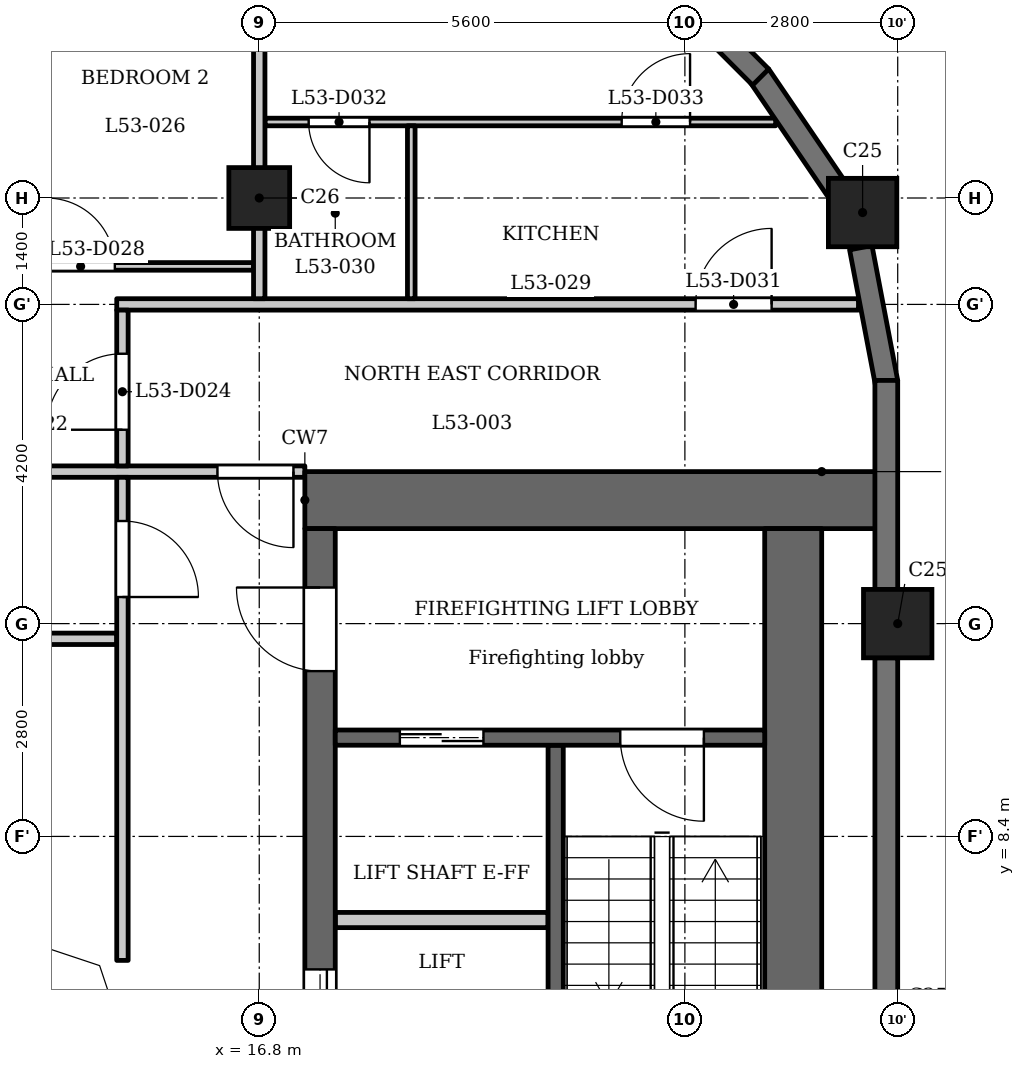
"""IFC4 building model, lengths in metres.
Left out: names, types, materials, properties, quantities, classifications, styles, units other than length and angle.
Written with IfcOpenShell. Run it as: python <this file> out.ifc"""

import sys

from ifc_helpers import new_model, si_unit, direction, frame, frame_2d, origin, origin_2d, place, context, subcontext, project, spatial, polyline, rectangle, outline, extrude, element, fill, save


model = new_model("IFC4")
c1 = context("Model", 3, precision=1e-05, world=origin(), true_north=direction((0.0, 1.0)))
c2 = subcontext(c1, "Body", "Model", "MODEL_VIEW")
j1 = project(units=[si_unit("LENGTHUNIT", "METRE"), si_unit("PLANEANGLEUNIT", "RADIAN")], contexts=[c1])
p1 = place(None, origin())
s1 = spatial("IfcSite", under=j1, at=p1, CompositionType="ELEMENT")
p2 = place(p1, origin())
s2 = spatial("IfcBuilding", under=s1, at=p2, CompositionType="ELEMENT")
p3 = place(p2, frame((0.0, 0.0, 206.4)))
s3 = spatial("IfcBuildingStorey", under=s2, at=p3, CompositionType="ELEMENT", Elevation=206.4)
for number, where, z_axis, x_axis in (
    (1, (25.2, 11.2, 0.0), (0.0, 0.0, 1.0), (1.0, 0.0, 0.0)),
    (2, (24.738, 16.609, 0.0), (0.0, 0.0, 1.0), (1.0, 0.0, 0.0)),
):
    element("IfcColumn", number, at=place(p3, frame(where, z_axis=z_axis, x_axis=x_axis)), inside=s3, PredefinedType="COLUMN", context=c2, shape_type="SweptSolid", body=[
        extrude(rectangle(XDim=0.9, YDim=0.9, at=origin_2d()), origin(), (0.0, 0.0, 1.0), 3.5),
    ])
p4 = place(p3, frame((16.8, 16.8, 0.0), z_axis=(0.0, 0.0, 1.0), x_axis=(1.0, 0.0, 0.0)))
e3 = element("IfcColumn", 3, at=p4, inside=s3, PredefinedType="COLUMN", context=c2, shape_type="SweptSolid", body=[
    extrude(rectangle(XDim=0.8, YDim=0.8, at=origin_2d()), origin(), (0.0, 0.0, 1.0), 3.5),
])
p5 = place(p3, frame((25.05, 6.05, 0.0), z_axis=(0.0, 0.0, 1.0), x_axis=(0.0, 1.0, 0.0)))
e4 = element("IfcWall", 4, at=p5, inside=s3, PredefinedType="SOLIDWALL", context=c2, shape_type="SweptSolid", body=[
    extrude(rectangle(XDim=4.7, YDim=0.3, at=frame_2d((2.35, 0.0))), origin(), (0.0, 0.0, 1.0), 2.5),
])
p6 = place(p3, frame((25.05, 11.65, 0.0), z_axis=(0.0, 0.0, 1.0), x_axis=(0.0, 1.0, 0.0)))
e5 = element("IfcWall", 5, at=p6, inside=s3, PredefinedType="SOLIDWALL", context=c2, shape_type="SweptSolid", body=[
    extrude(rectangle(XDim=2.75, YDim=0.3, at=frame_2d((1.375, 0.0))), origin(), (0.0, 0.0, 1.0), 2.5),
])
for number, where, z_axis, x_axis in (
    (6, (25.053, 14.372, 0.0), (0.0, 0.0, 1.0), (-0.187, 0.982, 0.0)),
    (7, (24.394, 16.919, 0.0), (0.0, 0.0, 1.0), (-0.562, 0.827, 0.0)),
):
    element("IfcWall", number, at=place(p3, frame(where, z_axis=z_axis, x_axis=x_axis)), inside=s3, PredefinedType="SOLIDWALL", context=c2, shape_type="SweptSolid", body=[
        extrude(rectangle(XDim=1.806, YDim=0.3, at=frame_2d((0.903, 0.0))), origin(), (0.0, 0.0, 1.0), 2.5),
    ])
p7 = place(p3, frame((23.397, 18.391, 0.0), z_axis=(0.0, 0.0, 1.0), x_axis=(-0.707106781187, 0.707106781187, 0.0)))
e8 = element("IfcWall", 8, at=p7, inside=s3, PredefinedType="SOLIDWALL", context=c2, shape_type="SweptSolid", body=[
    extrude(rectangle(XDim=2.75, YDim=0.3, at=frame_2d((1.375, 0.0))), origin(), (0.0, 0.0, 1.0), 2.5),
])
p8 = place(p7, frame((0.775, 0.0, 0.6)))
e9 = element("IfcOpeningElement", 9, at=p8, cuts=e8, PredefinedType="OPENING", context=c2, shape_type="SweptSolid", body=[
    extrude(rectangle(XDim=1.2, YDim=1.55, at=frame_2d((0.6, 0.775))), frame((0.0, 0.16, 0.0), z_axis=(0.0, -1.0, 0.0), x_axis=(1.0, 0.0, 0.0)), (0.0, 0.0, 1.0), 0.32),
])
p9 = place(p3, frame((20.7, 2.6, 0.0), z_axis=(0.0, 0.0, 1.0), x_axis=(0.0, 1.0, 0.0)))
e10 = element("IfcWall", 10, at=p9, inside=s3, PredefinedType="SHEAR", context=c2, shape_type="SweptSolid", body=[
    extrude(rectangle(XDim=7.0, YDim=0.2, at=frame_2d((3.5, 0.0))), origin(), (0.0, 0.0, 1.0), 3.2),
])
p10 = place(p3, frame((17.4, 12.825, 0.0), z_axis=(0.0, 0.0, 1.0), x_axis=(1.0, 0.0, 0.0)))
e11 = element("IfcWall", 11, at=p10, inside=s3, PredefinedType="SHEAR", context=c2, shape_type="SweptSolid", body=[
    extrude(rectangle(XDim=7.6, YDim=0.75, at=frame_2d((3.8, 0.0))), origin(), (0.0, 0.0, 1.0), 3.2),
])
p11 = place(p3, frame((17.6, -12.45, 0.0), z_axis=(0.0, 0.0, 1.0), x_axis=(0.0, 1.0, 0.0)))
e12 = element("IfcWall", 12, at=p11, inside=s3, PredefinedType="SHEAR", context=c2, shape_type="SweptSolid", body=[
    extrude(rectangle(XDim=24.9, YDim=0.4, at=frame_2d((12.45, 0.0))), origin(), (0.0, 0.0, 1.0), 3.2),
])
p12 = place(p11, frame((8.65, 0.0, 0.0)))
e13 = element("IfcOpeningElement", 13, at=p12, cuts=e12, PredefinedType="OPENING", context=c2, shape_type="SweptSolid", body=[
    extrude(rectangle(XDim=0.9, YDim=2.1, at=frame_2d((0.45, 1.05))), frame((0.0, 0.21, 0.0), z_axis=(0.0, -1.0, 0.0), x_axis=(1.0, 0.0, 0.0)), (0.0, 0.0, 1.0), 0.42),
])
p13 = place(p11, frame((15.6, 0.0, 0.0)))
e14 = element("IfcOpeningElement", 14, at=p13, cuts=e12, PredefinedType="OPENING", context=c2, shape_type="SweptSolid", body=[
    extrude(rectangle(XDim=1.1, YDim=2.1, at=frame_2d((0.55, 1.05))), frame((0.0, 0.21, 0.0), z_axis=(0.0, -1.0, 0.0), x_axis=(1.0, 0.0, 0.0)), (0.0, 0.0, 1.0), 0.42),
])
p14 = place(p11, frame((18.0, 0.0, 0.0)))
e15 = element("IfcOpeningElement", 15, at=p14, cuts=e12, PredefinedType="OPENING", context=c2, shape_type="SweptSolid", body=[
    extrude(rectangle(XDim=1.1, YDim=2.1, at=frame_2d((0.55, 1.05))), frame((0.0, 0.21, 0.0), z_axis=(0.0, -1.0, 0.0), x_axis=(1.0, 0.0, 0.0)), (0.0, 0.0, 1.0), 0.42),
])
p15 = place(p11, frame((23.025, 0.0, 0.0)))
e16 = element("IfcOpeningElement", 16, at=p15, cuts=e12, PredefinedType="OPENING", context=c2, shape_type="SweptSolid", body=[
    extrude(rectangle(XDim=1.1, YDim=2.1, at=frame_2d((0.55, 1.05))), frame((0.0, 0.21, 0.0), z_axis=(0.0, -1.0, 0.0), x_axis=(1.0, 0.0, 0.0)), (0.0, 0.0, 1.0), 0.42),
])
p16 = place(p11, frame((0.775, 0.0, 0.0)))
e17 = element("IfcOpeningElement", 17, at=p16, cuts=e12, PredefinedType="OPENING", context=c2, shape_type="SweptSolid", body=[
    extrude(rectangle(XDim=1.1, YDim=2.1, at=frame_2d((0.55, 1.05))), frame((0.0, 0.21, 0.0), z_axis=(0.0, -1.0, 0.0), x_axis=(1.0, 0.0, 0.0)), (0.0, 0.0, 1.0), 0.42),
])
p17 = place(p11, frame((12.925, 0.0, 0.0)))
e18 = element("IfcOpeningElement", 18, at=p17, cuts=e12, PredefinedType="OPENING", context=c2, shape_type="SweptSolid", body=[
    extrude(rectangle(XDim=1.8, YDim=2.1, at=frame_2d((0.9, 1.05))), frame((0.0, 0.21, 0.0), z_axis=(0.0, -1.0, 0.0), x_axis=(1.0, 0.0, 0.0)), (0.0, 0.0, 1.0), 0.42),
])
p18 = place(p3, frame((23.825, -12.45, 0.0), z_axis=(0.0, 0.0, 1.0), x_axis=(0.0, 1.0, 0.0)))
e19 = element("IfcWall", 19, at=p18, inside=s3, PredefinedType="SHEAR", context=c2, shape_type="SweptSolid", body=[
    extrude(rectangle(XDim=24.9, YDim=0.75, at=frame_2d((12.45, 0.0))), origin(), (0.0, 0.0, 1.0), 3.2),
])
p19 = place(p3, frame((17.8, 7.3, 0.0), z_axis=(0.0, 0.0, 1.0), x_axis=(1.0, 0.0, 0.0)))
e20 = element("IfcWall", 20, at=p19, inside=s3, PredefinedType="PARTITIONING", context=c2, shape_type="SweptSolid", body=[
    extrude(rectangle(XDim=2.8, YDim=0.2, at=frame_2d((1.4, 0.0))), origin(), (0.0, 0.0, 1.0), 3.2),
])
p20 = place(p3, frame((17.8, 9.7, 0.0), z_axis=(0.0, 0.0, 1.0), x_axis=(1.0, 0.0, 0.0)))
e21 = element("IfcWall", 21, at=p20, inside=s3, PredefinedType="SHEAR", context=c2, shape_type="SweptSolid", body=[
    extrude(rectangle(XDim=5.65, YDim=0.2, at=frame_2d((2.825, 0.0))), origin(), (0.0, 0.0, 1.0), 3.2),
])
p21 = place(p20, frame((0.85, 0.0, 0.0)))
e22 = element("IfcOpeningElement", 22, at=p21, cuts=e21, PredefinedType="OPENING", context=c2, shape_type="SweptSolid", body=[
    extrude(rectangle(XDim=1.1, YDim=2.1, at=frame_2d((0.55, 1.05))), frame((0.0, 0.11, 0.0), z_axis=(0.0, -1.0, 0.0), x_axis=(1.0, 0.0, 0.0)), (0.0, 0.0, 1.0), 0.22),
])
p22 = place(p20, frame((3.75, 0.0, 0.0)))
e23 = element("IfcOpeningElement", 23, at=p22, cuts=e21, PredefinedType="OPENING", context=c2, shape_type="SweptSolid", body=[
    extrude(rectangle(XDim=1.1, YDim=2.1, at=frame_2d((0.55, 1.05))), frame((0.0, 0.11, 0.0), z_axis=(0.0, -1.0, 0.0), x_axis=(1.0, 0.0, 0.0)), (0.0, 0.0, 1.0), 0.22),
])
p23 = place(p3, frame((-14.925, 11.0, 0.0), z_axis=(0.0, 0.0, 1.0), x_axis=(1.0, 0.0, 0.0)))
e24 = element("IfcWall", 24, at=p23, inside=s3, PredefinedType="PARTITIONING", context=c2, shape_type="SweptSolid", body=[
    extrude(rectangle(XDim=29.85, YDim=0.15, at=frame_2d((14.925, 0.0))), origin(), (0.0, 0.0, 1.0), 3.2),
])
p24 = place(p23, frame((2.475, 0.0, 0.0)))
e25 = element("IfcOpeningElement", 25, at=p24, cuts=e24, PredefinedType="OPENING", context=c2, shape_type="SweptSolid", body=[
    extrude(rectangle(XDim=1.0, YDim=2.1, at=frame_2d((0.5, 1.05))), frame((0.0, 0.085, 0.0), z_axis=(0.0, -1.0, 0.0), x_axis=(1.0, 0.0, 0.0)), (0.0, 0.0, 1.0), 0.17),
])
p25 = place(p23, frame((17.975, 0.0, 0.0)))
e26 = element("IfcOpeningElement", 26, at=p25, cuts=e24, PredefinedType="OPENING", context=c2, shape_type="SweptSolid", body=[
    extrude(rectangle(XDim=1.0, YDim=2.1, at=frame_2d((0.5, 1.05))), frame((0.0, 0.085, 0.0), z_axis=(0.0, -1.0, 0.0), x_axis=(1.0, 0.0, 0.0)), (0.0, 0.0, 1.0), 0.17),
])
p26 = place(p3, frame((-17.4, 13.2, 0.0), z_axis=(0.0, 0.0, 1.0), x_axis=(1.0, 0.0, 0.0)))
e27 = element("IfcWall", 27, at=p26, inside=s3, PredefinedType="PARTITIONING", context=c2, shape_type="SweptSolid", body=[
    extrude(rectangle(XDim=34.8, YDim=0.15, at=frame_2d((17.4, 0.0))), origin(), (0.0, 0.0, 1.0), 3.2),
])
p27 = place(p26, frame((0.25, 0.0, 0.0)))
e28 = element("IfcOpeningElement", 28, at=p27, cuts=e27, PredefinedType="OPENING", context=c2, shape_type="SweptSolid", body=[
    extrude(rectangle(XDim=1.0, YDim=2.1, at=frame_2d((0.5, 1.05))), frame((0.0, 0.085, 0.0), z_axis=(0.0, -1.0, 0.0), x_axis=(1.0, 0.0, 0.0)), (0.0, 0.0, 1.0), 0.17),
])
p28 = place(p26, frame((33.65, 0.0, 0.0)))
e29 = element("IfcOpeningElement", 29, at=p28, cuts=e27, PredefinedType="OPENING", context=c2, shape_type="SweptSolid", body=[
    extrude(rectangle(XDim=1.0, YDim=2.1, at=frame_2d((0.5, 1.05))), frame((0.0, 0.085, 0.0), z_axis=(0.0, -1.0, 0.0), x_axis=(1.0, 0.0, 0.0)), (0.0, 0.0, 1.0), 0.17),
])
p29 = place(p3, frame((14.925, 15.4, 0.0), z_axis=(0.0, 0.0, 1.0), x_axis=(1.0, 0.0, 0.0)))
e30 = element("IfcWall", 30, at=p29, inside=s3, PredefinedType="PARTITIONING", context=c2, shape_type="SweptSolid", body=[
    extrude(rectangle(XDim=9.759, YDim=0.15, at=frame_2d((4.879, 0.0))), origin(), (0.0, 0.0, 1.0), 3.2),
])
p30 = place(p29, frame((7.616, 0.0, 0.0)))
e31 = element("IfcOpeningElement", 31, at=p30, cuts=e30, PredefinedType="OPENING", context=c2, shape_type="SweptSolid", body=[
    extrude(rectangle(XDim=1.0, YDim=2.1, at=frame_2d((0.5, 1.05))), frame((0.0, 0.085, 0.0), z_axis=(0.0, -1.0, 0.0), x_axis=(1.0, 0.0, 0.0)), (0.0, 0.0, 1.0), 0.17),
])
p31 = place(p3, frame((-16.725, 15.9, 0.0), z_axis=(0.0, 0.0, 1.0), x_axis=(1.0, 0.0, 0.0)))
e32 = element("IfcWall", 32, at=p31, inside=s3, PredefinedType="PARTITIONING", context=c2, shape_type="SweptSolid", body=[
    extrude(rectangle(XDim=33.45, YDim=0.1, at=frame_2d((16.725, 0.0))), origin(), (0.0, 0.0, 1.0), 3.2),
])
p32 = place(p31, frame((1.875, 0.0, 0.0)))
e33 = element("IfcOpeningElement", 33, at=p32, cuts=e32, PredefinedType="OPENING", context=c2, shape_type="SweptSolid", body=[
    extrude(rectangle(XDim=0.9, YDim=2.1, at=frame_2d((0.45, 1.05))), frame((0.0, 0.06, 0.0), z_axis=(0.0, -1.0, 0.0), x_axis=(1.0, 0.0, 0.0)), (0.0, 0.0, 1.0), 0.12),
])
p33 = place(p31, frame((3.975, 0.0, 0.0)))
e34 = element("IfcOpeningElement", 34, at=p33, cuts=e32, PredefinedType="OPENING", context=c2, shape_type="SweptSolid", body=[
    extrude(rectangle(XDim=0.9, YDim=2.1, at=frame_2d((0.45, 1.05))), frame((0.0, 0.06, 0.0), z_axis=(0.0, -1.0, 0.0), x_axis=(1.0, 0.0, 0.0)), (0.0, 0.0, 1.0), 0.12),
])
p34 = place(p31, frame((6.825, 0.0, 0.0)))
e35 = element("IfcOpeningElement", 35, at=p34, cuts=e32, PredefinedType="OPENING", context=c2, shape_type="SweptSolid", body=[
    extrude(rectangle(XDim=0.9, YDim=2.1, at=frame_2d((0.45, 1.05))), frame((0.0, 0.06, 0.0), z_axis=(0.0, -1.0, 0.0), x_axis=(1.0, 0.0, 0.0)), (0.0, 0.0, 1.0), 0.12),
])
p35 = place(p31, frame((28.975, 0.0, 0.0)))
e36 = element("IfcOpeningElement", 36, at=p35, cuts=e32, PredefinedType="OPENING", context=c2, shape_type="SweptSolid", body=[
    extrude(rectangle(XDim=0.9, YDim=2.1, at=frame_2d((0.45, 1.05))), frame((0.0, 0.06, 0.0), z_axis=(0.0, -1.0, 0.0), x_axis=(1.0, 0.0, 0.0)), (0.0, 0.0, 1.0), 0.12),
])
p36 = place(p31, frame((30.725, 0.0, 0.0)))
e37 = element("IfcOpeningElement", 37, at=p36, cuts=e32, PredefinedType="OPENING", context=c2, shape_type="SweptSolid", body=[
    extrude(rectangle(XDim=0.9, YDim=2.1, at=frame_2d((0.45, 1.05))), frame((0.0, 0.06, 0.0), z_axis=(0.0, -1.0, 0.0), x_axis=(1.0, 0.0, 0.0)), (0.0, 0.0, 1.0), 0.12),
])
p37 = place(p31, frame((25.625, 0.0, 0.0)))
e38 = element("IfcOpeningElement", 38, at=p37, cuts=e32, PredefinedType="OPENING", context=c2, shape_type="SweptSolid", body=[
    extrude(rectangle(XDim=0.9, YDim=2.1, at=frame_2d((0.45, 1.05))), frame((0.0, 0.06, 0.0), z_axis=(0.0, -1.0, 0.0), x_axis=(1.0, 0.0, 0.0)), (0.0, 0.0, 1.0), 0.12),
])
p38 = place(p3, frame((16.875, 17.8, 0.0), z_axis=(0.0, 0.0, 1.0), x_axis=(1.0, 0.0, 0.0)))
e39 = element("IfcWall", 39, at=p38, inside=s3, PredefinedType="PARTITIONING", context=c2, shape_type="SweptSolid", body=[
    extrude(rectangle(XDim=6.719, YDim=0.1, at=frame_2d((3.359, 0.0))), origin(), (0.0, 0.0, 1.0), 3.2),
])
p39 = place(p38, frame((0.575, 0.0, 0.0)))
e40 = element("IfcOpeningElement", 40, at=p39, cuts=e39, PredefinedType="OPENING", context=c2, shape_type="SweptSolid", body=[
    extrude(rectangle(XDim=0.8, YDim=2.1, at=frame_2d((0.4, 1.05))), frame((0.0, 0.06, 0.0), z_axis=(0.0, -1.0, 0.0), x_axis=(1.0, 0.0, 0.0)), (0.0, 0.0, 1.0), 0.12),
])
p40 = place(p38, frame((4.693, 0.0, 0.0)))
e41 = element("IfcOpeningElement", 41, at=p40, cuts=e39, PredefinedType="OPENING", context=c2, shape_type="SweptSolid", body=[
    extrude(rectangle(XDim=0.9, YDim=2.1, at=frame_2d((0.45, 1.05))), frame((0.0, 0.06, 0.0), z_axis=(0.0, -1.0, 0.0), x_axis=(1.0, 0.0, 0.0)), (0.0, 0.0, 1.0), 0.12),
])
p41 = place(p3, frame((15.0, 6.769, 0.0), z_axis=(0.0, 0.0, 1.0), x_axis=(0.0, 1.0, 0.0)))
e42 = element("IfcWall", 42, at=p41, inside=s3, PredefinedType="PARTITIONING", context=c2, shape_type="SweptSolid", body=[
    extrude(rectangle(XDim=6.356, YDim=0.15, at=frame_2d((3.178, 0.0))), origin(), (0.0, 0.0, 1.0), 3.2),
])
p42 = place(p41, frame((4.781, 0.0, 0.0)))
e43 = element("IfcOpeningElement", 43, at=p42, cuts=e42, PredefinedType="OPENING", context=c2, shape_type="SweptSolid", body=[
    extrude(rectangle(XDim=1.0, YDim=2.1, at=frame_2d((0.5, 1.05))), frame((0.0, 0.085, 0.0), z_axis=(0.0, -1.0, 0.0), x_axis=(1.0, 0.0, 0.0)), (0.0, 0.0, 1.0), 0.17),
])
p43 = place(p3, frame((15.0, 13.275, 0.0), z_axis=(0.0, 0.0, 1.0), x_axis=(0.0, 1.0, 0.0)))
e44 = element("IfcWall", 44, at=p43, inside=s3, PredefinedType="PARTITIONING", context=c2, shape_type="SweptSolid", body=[
    extrude(rectangle(XDim=2.05, YDim=0.15, at=frame_2d((1.025, 0.0))), origin(), (0.0, 0.0, 1.0), 3.2),
])
p44 = place(p43, frame((0.476, 0.0, 0.0)))
e45 = element("IfcOpeningElement", 45, at=p44, cuts=e44, PredefinedType="OPENING", context=c2, shape_type="SweptSolid", body=[
    extrude(rectangle(XDim=1.0, YDim=2.1, at=frame_2d((0.5, 1.05))), frame((0.0, 0.085, 0.0), z_axis=(0.0, -1.0, 0.0), x_axis=(1.0, 0.0, 0.0)), (0.0, 0.0, 1.0), 0.17),
])
p45 = place(p3, frame((16.8, 15.475, 0.0), z_axis=(0.0, 0.0, 1.0), x_axis=(0.0, 1.0, 0.0)))
e46 = element("IfcWall", 46, at=p45, inside=s3, PredefinedType="PARTITIONING", context=c2, shape_type="SweptSolid", body=[
    extrude(rectangle(XDim=6.835, YDim=0.15, at=frame_2d((3.417, 0.0))), origin(), (0.0, 0.0, 1.0), 2.55),
])
p46 = place(p3, frame((18.8, 15.475, 0.0), z_axis=(0.0, 0.0, 1.0), x_axis=(0.0, 1.0, 0.0)))
e47 = element("IfcWall", 47, at=p46, inside=s3, PredefinedType="PARTITIONING", context=c2, shape_type="SweptSolid", body=[
    extrude(rectangle(XDim=2.275, YDim=0.1, at=frame_2d((1.137, 0.0))), origin(), (0.0, 0.0, 1.0), 3.2),
])
p47 = place(p3, origin())
e48 = element("IfcWall", 48, at=p47, inside=s3, PredefinedType="SOLIDWALL", context=c2, shape_type="SweptSolid", body=[
    extrude(outline(polyline([(14.937, 6.937), (13.849, 7.3), (13.8, 7.3), (13.8, 7.0), (14.7, 6.7), (15.0, 5.8), (15.3, 5.8), (15.3, 5.849), (14.937, 6.937)])), origin(), (0.0, 0.0, 1.0), 3.2),
])
p48 = place(p14, origin())
e49 = element("IfcDoor", 49, at=p48, inside=s3, OperationType="DOUBLE_DOOR_SLIDING", PredefinedType="DOOR", context=c2, shape_type="SweptSolid", body=[
    extrude(rectangle(XDim=1.1, YDim=2.1, at=frame_2d((0.55, 1.05))), frame((0.0, 0.025, 0.0), z_axis=(0.0, -1.0, 0.0), x_axis=(1.0, 0.0, 0.0)), (0.0, 0.0, 1.0), 0.05),
])
fill(e15, e49)
p49 = place(p21, origin())
e50 = element("IfcDoor", 50, at=p49, inside=s3, OperationType="DOUBLE_DOOR_SLIDING", PredefinedType="DOOR", context=c2, shape_type="SweptSolid", body=[
    extrude(rectangle(XDim=1.1, YDim=2.1, at=frame_2d((0.55, 1.05))), frame((0.0, 0.025, 0.0), z_axis=(0.0, -1.0, 0.0), x_axis=(1.0, 0.0, 0.0)), (0.0, 0.0, 1.0), 0.05),
])
fill(e22, e50)
p50 = place(p15, origin())
e51 = element("IfcDoor", 51, at=p50, inside=s3, OperationType="SINGLE_SWING_LEFT", PredefinedType="DOOR", context=c2, shape_type="SweptSolid", body=[
    extrude(rectangle(XDim=1.1, YDim=2.1, at=frame_2d((0.55, 1.05))), frame((0.0, 0.025, 0.0), z_axis=(0.0, -1.0, 0.0), x_axis=(1.0, 0.0, 0.0)), (0.0, 0.0, 1.0), 0.05),
])
fill(e16, e51)
p51 = place(p22, origin())
e52 = element("IfcDoor", 52, at=p51, inside=s3, OperationType="SINGLE_SWING_RIGHT", PredefinedType="DOOR", context=c2, shape_type="SweptSolid", body=[
    extrude(rectangle(XDim=1.1, YDim=2.1, at=frame_2d((0.55, 1.05))), frame((0.0, 0.025, 0.0), z_axis=(0.0, -1.0, 0.0), x_axis=(1.0, 0.0, 0.0)), (0.0, 0.0, 1.0), 0.05),
])
fill(e23, e52)
p52 = place(p42, origin())
e53 = element("IfcDoor", 53, at=p52, inside=s3, OperationType="SINGLE_SWING_LEFT", PredefinedType="DOOR", context=c2, shape_type="SweptSolid", body=[
    extrude(rectangle(XDim=1.0, YDim=2.1, at=frame_2d((0.5, 1.05))), frame((0.0, 0.025, 0.0), z_axis=(0.0, -1.0, 0.0), x_axis=(1.0, 0.0, 0.0)), (0.0, 0.0, 1.0), 0.05),
])
fill(e43, e53)
p53 = place(p28, origin())
e54 = element("IfcDoor", 54, at=p53, inside=s3, OperationType="SINGLE_SWING_RIGHT", PredefinedType="DOOR", context=c2, shape_type="SweptSolid", body=[
    extrude(rectangle(XDim=1.0, YDim=2.1, at=frame_2d((0.5, 1.05))), frame((0.0, 0.025, 0.0), z_axis=(0.0, -1.0, 0.0), x_axis=(1.0, 0.0, 0.0)), (0.0, 0.0, 1.0), 0.05),
])
fill(e29, e54)
p54 = place(p44, origin())
e55 = element("IfcDoor", 55, at=p54, inside=s3, OperationType="SINGLE_SWING_RIGHT", PredefinedType="DOOR", context=c2, shape_type="SweptSolid", body=[
    extrude(rectangle(XDim=1.0, YDim=2.1, at=frame_2d((0.5, 1.05))), frame((0.0, 0.025, 0.0), z_axis=(0.0, -1.0, 0.0), x_axis=(1.0, 0.0, 0.0)), (0.0, 0.0, 1.0), 0.05),
])
fill(e45, e55)
p55 = place(p36, origin())
e56 = element("IfcDoor", 56, at=p55, inside=s3, OperationType="SINGLE_SWING_RIGHT", PredefinedType="DOOR", context=c2, shape_type="SweptSolid", body=[
    extrude(rectangle(XDim=0.9, YDim=2.1, at=frame_2d((0.45, 1.05))), frame((0.0, 0.025, 0.0), z_axis=(0.0, -1.0, 0.0), x_axis=(1.0, 0.0, 0.0)), (0.0, 0.0, 1.0), 0.05),
])
fill(e37, e56)
p56 = place(p30, origin())
e57 = element("IfcDoor", 57, at=p56, inside=s3, OperationType="SINGLE_SWING_LEFT", PredefinedType="DOOR", context=c2, shape_type="SweptSolid", body=[
    extrude(rectangle(XDim=1.0, YDim=2.1, at=frame_2d((0.5, 1.05))), frame((0.0, 0.025, 0.0), z_axis=(0.0, -1.0, 0.0), x_axis=(1.0, 0.0, 0.0)), (0.0, 0.0, 1.0), 0.05),
])
fill(e31, e57)
p57 = place(p39, origin())
e58 = element("IfcDoor", 58, at=p57, inside=s3, OperationType="SINGLE_SWING_RIGHT", PredefinedType="DOOR", context=c2, shape_type="SweptSolid", body=[
    extrude(rectangle(XDim=0.8, YDim=2.1, at=frame_2d((0.4, 1.05))), frame((0.0, 0.025, 0.0), z_axis=(0.0, -1.0, 0.0), x_axis=(1.0, 0.0, 0.0)), (0.0, 0.0, 1.0), 0.05),
])
fill(e40, e58)
p58 = place(p40, origin())
e59 = element("IfcDoor", 59, at=p58, inside=s3, OperationType="SINGLE_SWING_LEFT", PredefinedType="DOOR", context=c2, shape_type="SweptSolid", body=[
    extrude(rectangle(XDim=0.9, YDim=2.1, at=frame_2d((0.45, 1.05))), frame((0.0, 0.025, 0.0), z_axis=(0.0, -1.0, 0.0), x_axis=(1.0, 0.0, 0.0)), (0.0, 0.0, 1.0), 0.05),
])
fill(e41, e59)
save(model, sys.argv[1])
